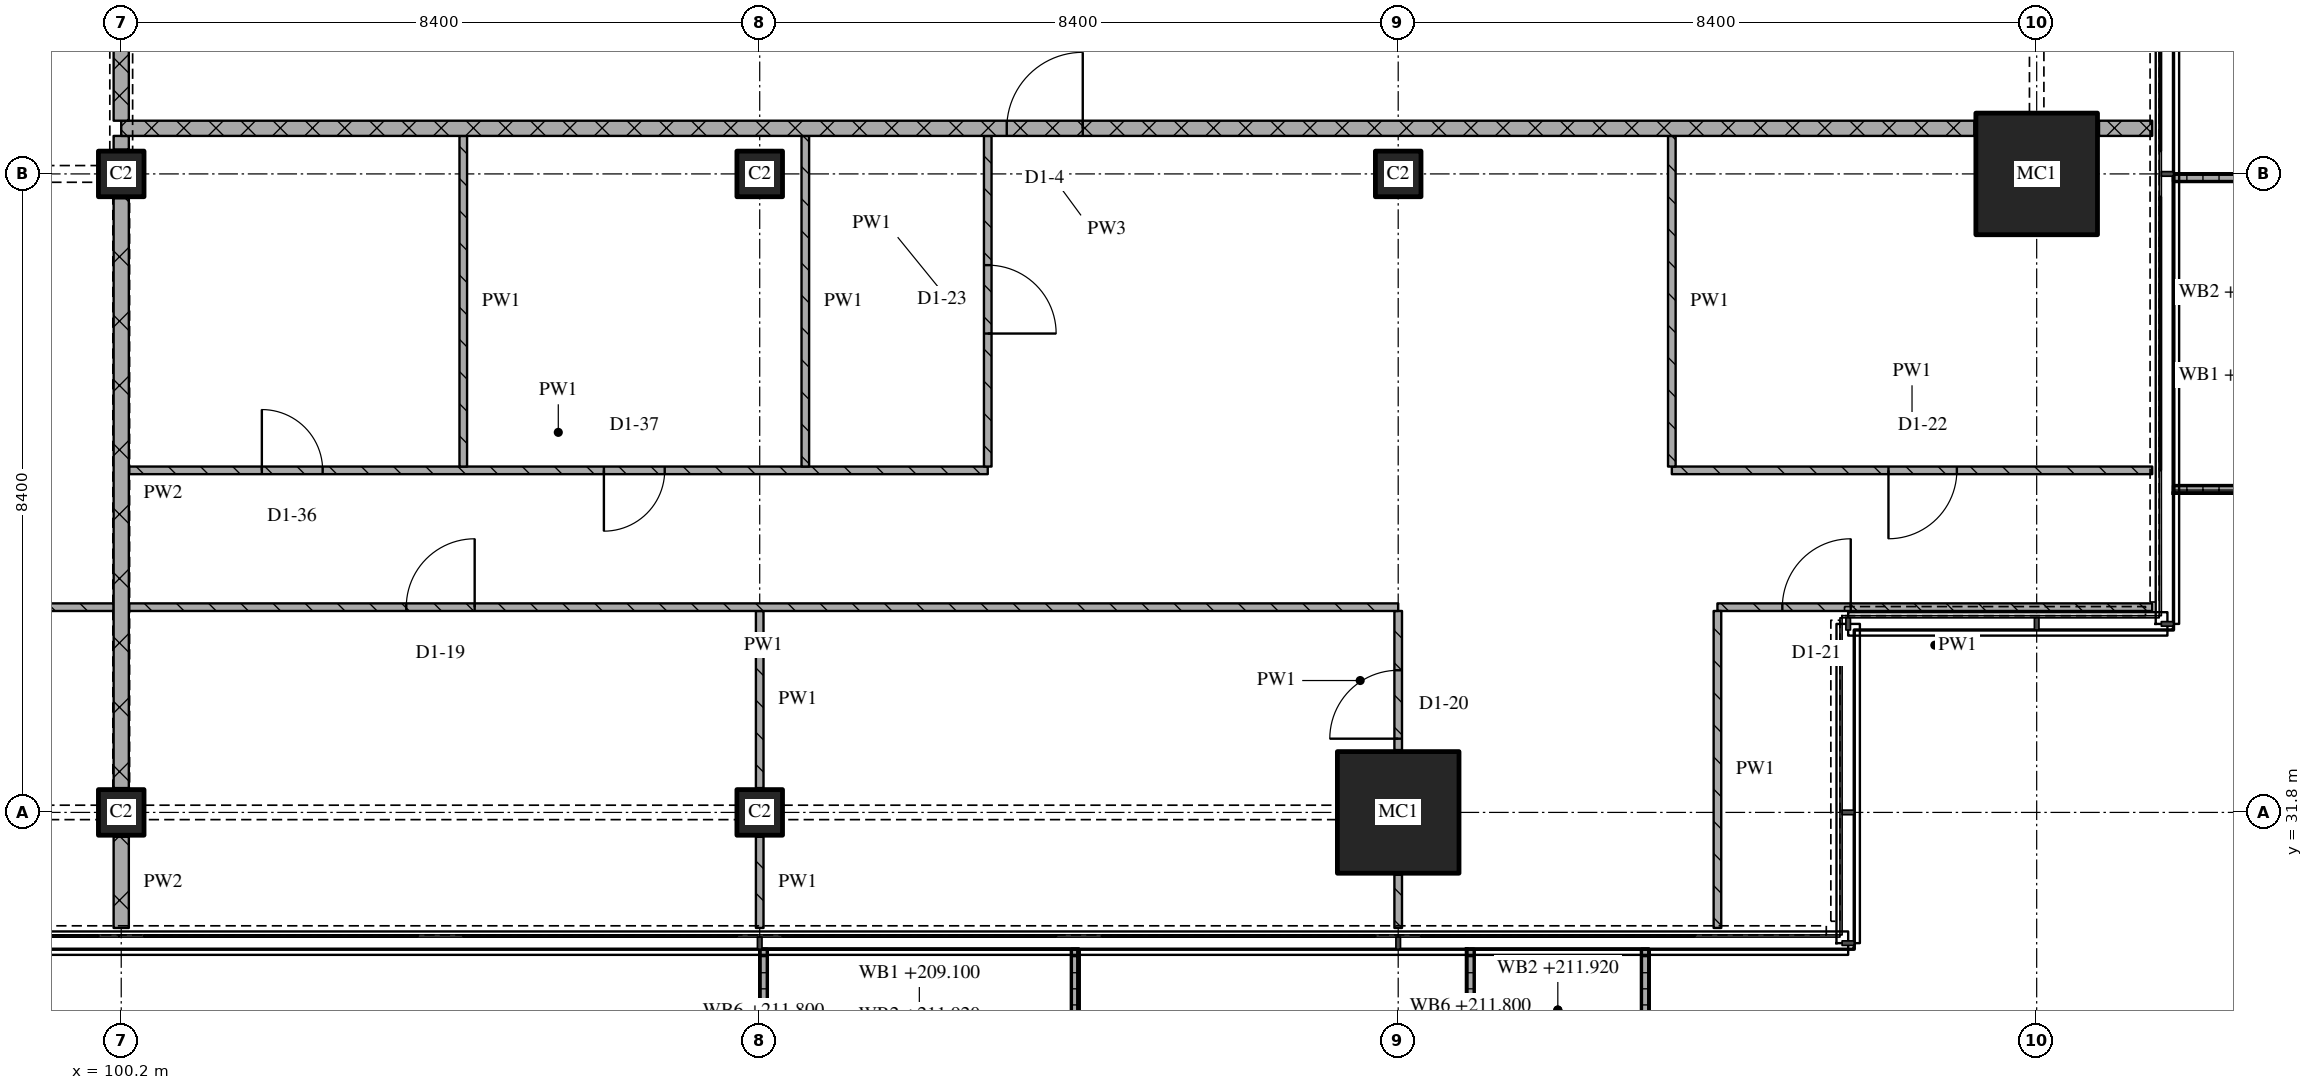
"""IFC4 building model, lengths in metres.
Left out: names, types, materials, properties, quantities, classifications, styles, units other than length and angle.
Written with IfcOpenShell. Run it as: python <this file> out.ifc"""

import sys

from ifc_helpers import new_model, si_unit, direction, frame, frame_2d, origin, origin_2d, place, context, subcontext, project, spatial, polyline, rectangle, outline, extrude, element, fill, save


model = new_model("IFC4")
c1 = context("Model", 3, precision=1e-05, world=origin(), true_north=direction((0.0, 1.0)))
c2 = subcontext(c1, "Body", "Model", "MODEL_VIEW")
j1 = project(units=[si_unit("LENGTHUNIT", "METRE"), si_unit("PLANEANGLEUNIT", "RADIAN")], contexts=[c1])
p1 = place(None, origin())
s1 = spatial("IfcSite", under=j1, at=p1, CompositionType="ELEMENT")
p2 = place(p1, origin())
s2 = spatial("IfcBuilding", under=s1, at=p2, CompositionType="ELEMENT")
p3 = place(p2, frame((0.0, 0.0, 209.1)))
s3 = spatial("IfcBuildingStorey", under=s2, at=p3, CompositionType="ELEMENT", Elevation=209.1)
for number, where, z_axis, x_axis in (
    (1, (100.2, 31.8, 0.0), (0.0, 0.0, 1.0), (1.0, 0.0, 0.0)),
    (2, (100.2, 40.2, 0.0), (0.0, 0.0, 1.0), (1.0, 0.0, 0.0)),
    (3, (108.6, 31.8, 0.0), (0.0, 0.0, 1.0), (1.0, 0.0, 0.0)),
    (4, (108.6, 40.2, 0.0), (0.0, 0.0, 1.0), (1.0, 0.0, 0.0)),
):
    element("IfcColumn", number, at=place(p3, frame(where, z_axis=z_axis, x_axis=x_axis)), inside=s3, PredefinedType="COLUMN", context=c2, shape_type="SweptSolid", body=[
        extrude(rectangle(XDim=0.6, YDim=0.6, at=origin_2d()), origin(), (0.0, 0.0, 1.0), 3.6),
    ])
p4 = place(p3, frame((117.0, 31.8, 0.0), z_axis=(0.0, 0.0, 1.0), x_axis=(1.0, 0.0, 0.0)))
e5 = element("IfcColumn", 5, at=p4, inside=s3, PredefinedType="COLUMN", context=c2, shape_type="SweptSolid", body=[
    extrude(rectangle(XDim=1.6, YDim=1.6, at=origin_2d()), origin(), (0.0, 0.0, 1.0), 3.6),
])
p5 = place(p3, frame((117.0, 40.2, 0.0), z_axis=(0.0, 0.0, 1.0), x_axis=(1.0, 0.0, 0.0)))
e6 = element("IfcColumn", 6, at=p5, inside=s3, PredefinedType="COLUMN", context=c2, shape_type="SweptSolid", body=[
    extrude(rectangle(XDim=0.6, YDim=0.6, at=origin_2d()), origin(), (0.0, 0.0, 1.0), 3.6),
])
p6 = place(p3, frame((125.4, 40.2, 0.0), z_axis=(0.0, 0.0, 1.0), x_axis=(1.0, 0.0, 0.0)))
e7 = element("IfcColumn", 7, at=p6, inside=s3, PredefinedType="COLUMN", context=c2, shape_type="SweptSolid", body=[
    extrude(rectangle(XDim=1.6, YDim=1.6, at=origin_2d()), origin(), (0.0, 0.0, 1.0), 3.6),
])
p7 = place(p3, origin())
e8 = element("IfcWall", 8, at=p7, inside=s3, PredefinedType="SOLIDWALL", context=c2, shape_type="SweptSolid", body=[
    extrude(outline(polyline([(108.6, 30.0), (108.7, 30.0), (108.7, 28.367), (112.7, 28.367), (112.7, 30.0), (112.8, 30.0), (112.8, 28.267), (108.6, 28.267), (108.6, 30.0)])), origin(), (0.0, 0.0, 1.0), 1.0),
])
p8 = place(p3, origin())
e9 = element("IfcWall", 9, at=p8, inside=s3, PredefinedType="SOLIDWALL", context=c2, shape_type="SweptSolid", body=[
    extrude(outline(polyline([(117.9, 30.0), (118.0, 30.0), (118.0, 28.5), (120.2, 28.5), (120.2, 30.0), (120.3, 30.0), (120.3, 28.4), (117.9, 28.4), (117.9, 30.0)])), origin(), (0.0, 0.0, 1.0), 1.0),
])
p9 = place(p3, origin())
e10 = element("IfcWall", 10, at=p9, inside=s3, PredefinedType="SOLIDWALL", context=c2, shape_type="SweptSolid", body=[
    extrude(outline(polyline([(127.2, 36.0), (127.2, 36.1), (128.833, 36.1), (128.833, 40.1), (127.2, 40.1), (127.2, 40.2), (128.933, 40.2), (128.933, 36.0), (127.2, 36.0)])), origin(), (0.0, 0.0, 1.0), 1.0),
])
p10 = place(p3, frame((126.92, 34.5, 0.0), z_axis=(0.0, 0.0, 1.0), x_axis=(-1.0, 0.0, 0.0)))
e11 = element("IfcWall", 11, at=p10, inside=s3, PredefinedType="PARTITIONING", context=c2, shape_type="SweptSolid", body=[
    extrude(rectangle(XDim=5.72, YDim=0.1, at=frame_2d((2.86, 0.0))), origin(), (0.0, 0.0, 1.0), 3.32),
])
p11 = place(p10, frame((3.966, 0.0, 0.0)))
e12 = element("IfcOpeningElement", 12, at=p11, cuts=e11, PredefinedType="OPENING", context=c2, shape_type="SweptSolid", body=[
    extrude(rectangle(XDim=0.9, YDim=2.1, at=frame_2d((0.45, 1.05))), frame((0.0, 0.06, 0.0), z_axis=(0.0, -1.0, 0.0), x_axis=(1.0, 0.0, 0.0)), (0.0, 0.0, 1.0), 0.12),
])
p12 = place(p3, frame((100.3, 36.3, 0.0), z_axis=(0.0, 0.0, 1.0), x_axis=(1.0, 0.0, 0.0)))
e13 = element("IfcWall", 13, at=p12, inside=s3, PredefinedType="PARTITIONING", context=c2, shape_type="SweptSolid", body=[
    extrude(rectangle(XDim=11.3, YDim=0.1, at=frame_2d((5.65, 0.0))), origin(), (0.0, 0.0, 1.0), 3.32),
])
p13 = place(p12, frame((1.75, 0.0, 0.0)))
e14 = element("IfcOpeningElement", 14, at=p13, cuts=e13, PredefinedType="OPENING", context=c2, shape_type="SweptSolid", body=[
    extrude(rectangle(XDim=0.8, YDim=2.1, at=frame_2d((0.4, 1.05))), frame((0.0, 0.06, 0.0), z_axis=(0.0, -1.0, 0.0), x_axis=(1.0, 0.0, 0.0)), (0.0, 0.0, 1.0), 0.12),
])
p14 = place(p12, frame((6.25, 0.0, 0.0)))
e15 = element("IfcOpeningElement", 15, at=p14, cuts=e13, PredefinedType="OPENING", context=c2, shape_type="SweptSolid", body=[
    extrude(rectangle(XDim=0.8, YDim=2.1, at=frame_2d((0.4, 1.05))), frame((0.0, 0.06, 0.0), z_axis=(0.0, -1.0, 0.0), x_axis=(1.0, 0.0, 0.0)), (0.0, 0.0, 1.0), 0.12),
])
p15 = place(p3, frame((120.6, 36.3, 0.0), z_axis=(0.0, 0.0, 1.0), x_axis=(1.0, 0.0, 0.0)))
e16 = element("IfcWall", 16, at=p15, inside=s3, PredefinedType="PARTITIONING", context=c2, shape_type="SweptSolid", body=[
    extrude(rectangle(XDim=6.32, YDim=0.1, at=frame_2d((3.16, 0.0))), origin(), (0.0, 0.0, 1.0), 3.32),
])
p16 = place(p15, frame((2.85, 0.0, 0.0)))
e17 = element("IfcOpeningElement", 17, at=p16, cuts=e16, PredefinedType="OPENING", context=c2, shape_type="SweptSolid", body=[
    extrude(rectangle(XDim=0.9, YDim=2.1, at=frame_2d((0.45, 1.05))), frame((0.0, 0.06, 0.0), z_axis=(0.0, -1.0, 0.0), x_axis=(1.0, 0.0, 0.0)), (0.0, 0.0, 1.0), 0.12),
])
p17 = place(p3, frame((124.58, 40.8, 0.0), z_axis=(0.0, 0.0, 1.0), x_axis=(-1.0, 0.0, 0.0)))
e18 = element("IfcWall", 18, at=p17, inside=s3, PredefinedType="PARTITIONING", context=c2, shape_type="SweptSolid", body=[
    extrude(rectangle(XDim=24.38, YDim=0.2, at=frame_2d((12.19, 0.0))), origin(), (0.0, 0.0, 1.0), 3.32),
])
p18 = place(p17, frame((11.73, 0.0, 0.0)))
e19 = element("IfcOpeningElement", 19, at=p18, cuts=e18, PredefinedType="OPENING", context=c2, shape_type="SweptSolid", body=[
    extrude(rectangle(XDim=1.0, YDim=2.1, at=frame_2d((0.5, 1.05))), frame((0.0, 0.11, 0.0), z_axis=(0.0, -1.0, 0.0), x_axis=(1.0, 0.0, 0.0)), (0.0, 0.0, 1.0), 0.22),
])
p19 = place(p3, frame((126.22, 40.8, 0.0), z_axis=(0.0, 0.0, 1.0), x_axis=(1.0, 0.0, 0.0)))
e20 = element("IfcWall", 20, at=p19, inside=s3, PredefinedType="PARTITIONING", context=c2, shape_type="SweptSolid", body=[
    extrude(rectangle(XDim=0.7, YDim=0.2, at=frame_2d((0.35, 0.0))), origin(), (0.0, 0.0, 1.0), 3.32),
])
p20 = place(p3, frame((100.2, 43.1, 0.0), z_axis=(0.0, 0.0, 1.0), x_axis=(0.0, -1.0, 0.0)))
e21 = element("IfcWall", 21, at=p20, inside=s3, PredefinedType="PARTITIONING", context=c2, shape_type="SweptSolid", body=[
    extrude(rectangle(XDim=2.2, YDim=0.2, at=frame_2d((1.1, 0.0))), origin(), (0.0, 0.0, 1.0), 2.53),
])
p21 = place(p3, frame((100.2, 31.48, 0.0), z_axis=(0.0, 0.0, 1.0), x_axis=(0.0, -1.0, 0.0)))
e22 = element("IfcWall", 22, at=p21, inside=s3, PredefinedType="PARTITIONING", context=c2, shape_type="SweptSolid", body=[
    extrude(rectangle(XDim=1.2, YDim=0.2, at=frame_2d((0.6, 0.0))), origin(), (0.0, 0.0, 1.0), 3.32),
])
p22 = place(p3, frame((100.2, 39.88, 0.0), z_axis=(0.0, 0.0, 1.0), x_axis=(0.0, -1.0, 0.0)))
e23 = element("IfcWall", 23, at=p22, inside=s3, PredefinedType="PARTITIONING", context=c2, shape_type="SweptSolid", body=[
    extrude(rectangle(XDim=7.76, YDim=0.2, at=frame_2d((3.88, 0.0))), origin(), (0.0, 0.0, 1.0), 2.72),
])
p23 = place(p3, frame((100.2, 40.7, 0.0), z_axis=(0.0, 0.0, 1.0), x_axis=(0.0, -1.0, 0.0)))
e24 = element("IfcWall", 24, at=p23, inside=s3, PredefinedType="PARTITIONING", context=c2, shape_type="SweptSolid", body=[
    extrude(rectangle(XDim=0.18, YDim=0.2, at=frame_2d((0.09, 0.0))), origin(), (0.0, 0.0, 1.0), 3.32),
])
p24 = place(p3, frame((104.7, 40.7, 0.0), z_axis=(0.0, 0.0, 1.0), x_axis=(0.0, -1.0, 0.0)))
e25 = element("IfcWall", 25, at=p24, inside=s3, PredefinedType="PARTITIONING", context=c2, shape_type="SweptSolid", body=[
    extrude(rectangle(XDim=4.35, YDim=0.1, at=frame_2d((2.175, 0.0))), origin(), (0.0, 0.0, 1.0), 3.32),
])
p25 = place(p3, frame((108.6, 31.48, 0.0), z_axis=(0.0, 0.0, 1.0), x_axis=(0.0, -1.0, 0.0)))
e26 = element("IfcWall", 26, at=p25, inside=s3, PredefinedType="PARTITIONING", context=c2, shape_type="SweptSolid", body=[
    extrude(rectangle(XDim=1.2, YDim=0.1, at=frame_2d((0.6, 0.0))), origin(), (0.0, 0.0, 1.0), 3.32),
])
p26 = place(p3, frame((108.6, 34.45, 0.0), z_axis=(0.0, 0.0, 1.0), x_axis=(0.0, -1.0, 0.0)))
e27 = element("IfcWall", 27, at=p26, inside=s3, PredefinedType="PARTITIONING", context=c2, shape_type="SweptSolid", body=[
    extrude(rectangle(XDim=2.33, YDim=0.1, at=frame_2d((1.165, 0.0))), origin(), (0.0, 0.0, 1.0), 3.32),
])
p27 = place(p3, frame((109.2, 40.7, 0.0), z_axis=(0.0, 0.0, 1.0), x_axis=(0.0, -1.0, 0.0)))
e28 = element("IfcWall", 28, at=p27, inside=s3, PredefinedType="PARTITIONING", context=c2, shape_type="SweptSolid", body=[
    extrude(rectangle(XDim=4.35, YDim=0.1, at=frame_2d((2.175, 0.0))), origin(), (0.0, 0.0, 1.0), 3.32),
])
p28 = place(p3, frame((111.6, 36.35, 0.0), z_axis=(0.0, 0.0, 1.0), x_axis=(0.0, 1.0, 0.0)))
e29 = element("IfcWall", 29, at=p28, inside=s3, PredefinedType="PARTITIONING", context=c2, shape_type="SweptSolid", body=[
    extrude(rectangle(XDim=4.35, YDim=0.1, at=frame_2d((2.175, 0.0))), origin(), (0.0, 0.0, 1.0), 3.32),
])
p29 = place(p28, frame((1.75, 0.0, 0.0)))
e30 = element("IfcOpeningElement", 30, at=p29, cuts=e29, PredefinedType="OPENING", context=c2, shape_type="SweptSolid", body=[
    extrude(rectangle(XDim=0.9, YDim=2.1, at=frame_2d((0.45, 1.05))), frame((0.0, 0.06, 0.0), z_axis=(0.0, -1.0, 0.0), x_axis=(1.0, 0.0, 0.0)), (0.0, 0.0, 1.0), 0.12),
])
p30 = place(p3, frame((117.0, 30.98, 0.0), z_axis=(0.0, 0.0, 1.0), x_axis=(0.0, -1.0, 0.0)))
e31 = element("IfcWall", 31, at=p30, inside=s3, PredefinedType="PARTITIONING", context=c2, shape_type="SweptSolid", body=[
    extrude(rectangle(XDim=0.7, YDim=0.1, at=frame_2d((0.35, 0.0))), origin(), (0.0, 0.0, 1.0), 3.32),
])
p31 = place(p3, frame((117.0, 32.62, 0.0), z_axis=(0.0, 0.0, 1.0), x_axis=(0.0, 1.0, 0.0)))
e32 = element("IfcWall", 32, at=p31, inside=s3, PredefinedType="PARTITIONING", context=c2, shape_type="SweptSolid", body=[
    extrude(rectangle(XDim=1.83, YDim=0.1, at=frame_2d((0.915, 0.0))), origin(), (0.0, 0.0, 1.0), 3.32),
])
p32 = place(p31, frame((0.15, 0.0, 0.0)))
e33 = element("IfcOpeningElement", 33, at=p32, cuts=e32, PredefinedType="OPENING", context=c2, shape_type="SweptSolid", body=[
    extrude(rectangle(XDim=0.9, YDim=2.1, at=frame_2d((0.45, 1.05))), frame((0.0, 0.06, 0.0), z_axis=(0.0, -1.0, 0.0), x_axis=(1.0, 0.0, 0.0)), (0.0, 0.0, 1.0), 0.12),
])
p33 = place(p3, frame((120.6, 40.7, 0.0), z_axis=(0.0, 0.0, 1.0), x_axis=(0.0, -1.0, 0.0)))
e34 = element("IfcWall", 34, at=p33, inside=s3, PredefinedType="PARTITIONING", context=c2, shape_type="SweptSolid", body=[
    extrude(rectangle(XDim=4.35, YDim=0.1, at=frame_2d((2.175, 0.0))), origin(), (0.0, 0.0, 1.0), 3.32),
])
p34 = place(p3, frame((121.2, 34.45, 0.0), z_axis=(0.0, 0.0, 1.0), x_axis=(0.0, -1.0, 0.0)))
e35 = element("IfcWall", 35, at=p34, inside=s3, PredefinedType="PARTITIONING", context=c2, shape_type="SweptSolid", body=[
    extrude(rectangle(XDim=4.17, YDim=0.1, at=frame_2d((2.085, 0.0))), origin(), (0.0, 0.0, 1.0), 3.32),
])
p35 = place(p3, frame((100.1, 34.5, 0.0), z_axis=(0.0, 0.0, 1.0), x_axis=(-1.0, 0.0, 0.0)))
e36 = element("IfcWall", 36, at=p35, inside=s3, PredefinedType="PARTITIONING", context=c2, shape_type="SweptSolid", body=[
    extrude(rectangle(XDim=4.1, YDim=0.1, at=frame_2d((2.05, 0.0))), origin(), (0.0, 0.0, 1.0), 3.32),
])
p36 = place(p35, frame((1.55, 0.0, 0.0)))
e37 = element("IfcOpeningElement", 37, at=p36, cuts=e36, PredefinedType="OPENING", context=c2, shape_type="SweptSolid", body=[
    extrude(rectangle(XDim=0.9, YDim=2.1, at=frame_2d((0.45, 1.05))), frame((0.0, 0.06, 0.0), z_axis=(0.0, -1.0, 0.0), x_axis=(1.0, 0.0, 0.0)), (0.0, 0.0, 1.0), 0.12),
])
p37 = place(p3, frame((117.0, 34.5, 0.0), z_axis=(0.0, 0.0, 1.0), x_axis=(-1.0, 0.0, 0.0)))
e38 = element("IfcWall", 38, at=p37, inside=s3, PredefinedType="PARTITIONING", context=c2, shape_type="SweptSolid", body=[
    extrude(rectangle(XDim=16.7, YDim=0.1, at=frame_2d((8.35, 0.0))), origin(), (0.0, 0.0, 1.0), 3.32),
])
p38 = place(p37, frame((12.15, 0.0, 0.0)))
e39 = element("IfcOpeningElement", 39, at=p38, cuts=e38, PredefinedType="OPENING", context=c2, shape_type="SweptSolid", body=[
    extrude(rectangle(XDim=0.9, YDim=2.1, at=frame_2d((0.45, 1.05))), frame((0.0, 0.06, 0.0), z_axis=(0.0, -1.0, 0.0), x_axis=(1.0, 0.0, 0.0)), (0.0, 0.0, 1.0), 0.12),
])
p39 = place(p11, origin())
e40 = element("IfcDoor", 40, at=p39, inside=s3, OperationType="SINGLE_SWING_RIGHT", PredefinedType="DOOR", context=c2, shape_type="SweptSolid", body=[
    extrude(rectangle(XDim=0.9, YDim=2.1, at=frame_2d((0.45, 1.05))), frame((0.0, 0.025, 0.0), z_axis=(0.0, -1.0, 0.0), x_axis=(1.0, 0.0, 0.0)), (0.0, 0.0, 1.0), 0.05),
])
fill(e12, e40)
p40 = place(p13, origin())
e41 = element("IfcDoor", 41, at=p40, inside=s3, OperationType="SINGLE_SWING_LEFT", PredefinedType="DOOR", context=c2, shape_type="SweptSolid", body=[
    extrude(rectangle(XDim=0.8, YDim=2.1, at=frame_2d((0.4, 1.05))), frame((0.0, 0.025, 0.0), z_axis=(0.0, -1.0, 0.0), x_axis=(1.0, 0.0, 0.0)), (0.0, 0.0, 1.0), 0.05),
])
fill(e14, e41)
p41 = place(p14, origin())
e42 = element("IfcDoor", 42, at=p41, inside=s3, OperationType="SINGLE_SWING_RIGHT", PredefinedType="DOOR", context=c2, shape_type="SweptSolid", body=[
    extrude(rectangle(XDim=0.8, YDim=2.1, at=frame_2d((0.4, 1.05))), frame((0.0, 0.025, 0.0), z_axis=(0.0, -1.0, 0.0), x_axis=(1.0, 0.0, 0.0)), (0.0, 0.0, 1.0), 0.05),
])
fill(e15, e42)
p42 = place(p16, origin())
e43 = element("IfcDoor", 43, at=p42, inside=s3, OperationType="SINGLE_SWING_RIGHT", PredefinedType="DOOR", context=c2, shape_type="SweptSolid", body=[
    extrude(rectangle(XDim=0.9, YDim=2.1, at=frame_2d((0.45, 1.05))), frame((0.0, 0.025, 0.0), z_axis=(0.0, -1.0, 0.0), x_axis=(1.0, 0.0, 0.0)), (0.0, 0.0, 1.0), 0.05),
])
fill(e17, e43)
p43 = place(p18, origin())
e44 = element("IfcDoor", 44, at=p43, inside=s3, OperationType="SINGLE_SWING_RIGHT", PredefinedType="DOOR", context=c2, shape_type="SweptSolid", body=[
    extrude(rectangle(XDim=1.0, YDim=2.1, at=frame_2d((0.5, 1.05))), frame((0.0, 0.025, 0.0), z_axis=(0.0, -1.0, 0.0), x_axis=(1.0, 0.0, 0.0)), (0.0, 0.0, 1.0), 0.05),
])
fill(e19, e44)
p44 = place(p29, origin())
e45 = element("IfcDoor", 45, at=p44, inside=s3, OperationType="SINGLE_SWING_RIGHT", PredefinedType="DOOR", context=c2, shape_type="SweptSolid", body=[
    extrude(rectangle(XDim=0.9, YDim=2.1, at=frame_2d((0.45, 1.05))), frame((0.0, 0.025, 0.0), z_axis=(0.0, -1.0, 0.0), x_axis=(1.0, 0.0, 0.0)), (0.0, 0.0, 1.0), 0.05),
])
fill(e30, e45)
p45 = place(p32, origin())
e46 = element("IfcDoor", 46, at=p45, inside=s3, OperationType="SINGLE_SWING_LEFT", PredefinedType="DOOR", context=c2, shape_type="SweptSolid", body=[
    extrude(rectangle(XDim=0.9, YDim=2.1, at=frame_2d((0.45, 1.05))), frame((0.0, 0.025, 0.0), z_axis=(0.0, -1.0, 0.0), x_axis=(1.0, 0.0, 0.0)), (0.0, 0.0, 1.0), 0.05),
])
fill(e33, e46)
p46 = place(p38, origin())
e47 = element("IfcDoor", 47, at=p46, inside=s3, OperationType="SINGLE_SWING_RIGHT", PredefinedType="DOOR", context=c2, shape_type="SweptSolid", body=[
    extrude(rectangle(XDim=0.9, YDim=2.1, at=frame_2d((0.45, 1.05))), frame((0.0, 0.025, 0.0), z_axis=(0.0, -1.0, 0.0), x_axis=(1.0, 0.0, 0.0)), (0.0, 0.0, 1.0), 0.05),
])
fill(e39, e47)
save(model, sys.argv[1])
